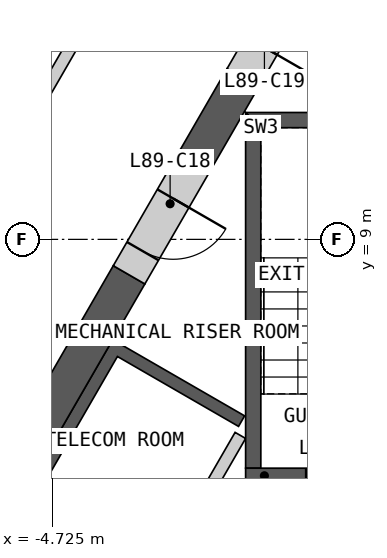
"""IFC4 building model, lengths in metres.
Left out: names, types, materials, properties, quantities, classifications, styles, units other than length and angle.
Written with IfcOpenShell. Run it as: python <this file> out.ifc"""

import sys

from ifc_helpers import new_model, si_unit, direction, frame, frame_2d, origin, place, context, subcontext, project, spatial, polyline, rectangle, outline, extrude, element, fill, save


model = new_model("IFC4")
c1 = context("Model", 3, precision=1e-05, world=origin(), true_north=direction((0.0, 1.0)))
c2 = subcontext(c1, "Body", "Model", "MODEL_VIEW")
j1 = project(units=[si_unit("LENGTHUNIT", "METRE"), si_unit("PLANEANGLEUNIT", "RADIAN")], contexts=[c1])
p1 = place(None, origin())
s1 = spatial("IfcSite", under=j1, at=p1, CompositionType="ELEMENT")
p2 = place(p1, origin())
s2 = spatial("IfcBuilding", under=s1, at=p2, CompositionType="ELEMENT")
p3 = place(p2, frame((0.0, 0.0, 391.6)))
s3 = spatial("IfcBuildingStorey", under=s2, at=p3, CompositionType="ELEMENT", Elevation=391.6)
p4 = place(p3, origin())
e1 = element("IfcWall", 1, at=p4, inside=s3, PredefinedType="SHEAR", context=c2, shape_type="SweptSolid", body=[
    extrude(outline(polyline([(-4.96, 0.208), (-7.131, 1.461), (-3.731, 7.35), (-1.561, 6.097), (-1.66, 5.924), (-3.652, 7.074), (-5.752, 3.437), (-3.76, 2.287), (-3.861, 2.113), (-5.852, 3.263), (-6.852, 1.531), (-4.861, 0.381), (-4.96, 0.208)])), origin(), (0.0, 0.0, 1.0), 3.1),
])
p5 = place(p3, frame((-1.631, 5.776, 0.0), z_axis=(0.0, 0.0, 1.0), x_axis=(-0.499992876559, -0.866029516466, 0.0)))
e2 = element("IfcWall", 2, at=p5, inside=s3, PredefinedType="SOLIDWALL", context=c2, shape_type="SweptSolid", body=[
    extrude(rectangle(XDim=6.486, YDim=0.2, at=frame_2d((3.243, 0.0))), origin(), (0.0, 0.0, 1.0), 3.1),
])
p6 = place(p5, frame((1.537, 0.0, 0.0)))
e3 = element("IfcOpeningElement", 3, at=p6, cuts=e2, PredefinedType="OPENING", context=c2, shape_type="SweptSolid", body=[
    extrude(rectangle(XDim=0.9, YDim=2.1, at=frame_2d((0.45, 1.05))), frame((0.0, 0.11, 0.0), z_axis=(0.0, -1.0, 0.0), x_axis=(1.0, 0.0, 0.0)), (0.0, 0.0, 1.0), 0.22),
])
p7 = place(p5, frame((4.837, 0.0, 0.0)))
e4 = element("IfcOpeningElement", 4, at=p7, cuts=e2, PredefinedType="OPENING", context=c2, shape_type="SweptSolid", body=[
    extrude(rectangle(XDim=0.9, YDim=2.1, at=frame_2d((0.45, 1.05))), frame((0.0, 0.11, 0.0), z_axis=(0.0, -1.0, 0.0), x_axis=(1.0, 0.0, 0.0)), (0.0, 0.0, 1.0), 0.22),
])
p8 = place(p3, origin())
e5 = element("IfcWall", 5, at=p8, inside=s3, PredefinedType="SHEAR", context=c2, shape_type="SweptSolid", body=[
    extrude(outline(polyline([(1.544, 11.087), (-1.544, 11.087), (-1.294, 10.837), (1.294, 10.837), (1.544, 11.087)])), origin(), (0.0, 0.0, 1.0), 3.1),
])
p9 = place(p3, origin())
e6 = element("IfcWall", 6, at=p9, inside=s3, PredefinedType="SHEAR", context=c2, shape_type="SweptSolid", body=[
    extrude(outline(polyline([(-1.294, 10.837), (-1.544, 11.087), (-1.544, 5.237), (-1.294, 5.237), (-1.294, 10.837)])), origin(), (0.0, 0.0, 1.0), 3.1),
])
p10 = place(p3, frame((1.544, 5.112, 0.0), z_axis=(0.0, 0.0, 1.0), x_axis=(-1.0, 0.0, 0.0)))
e7 = element("IfcWall", 7, at=p10, inside=s3, PredefinedType="SHEAR", context=c2, shape_type="SweptSolid", body=[
    extrude(rectangle(XDim=3.088, YDim=0.25, at=frame_2d((1.544, 0.0))), origin(), (0.0, 0.0, 1.0), 3.1),
])
p11 = place(p10, frame((0.994, 0.0, 0.0)))
e8 = element("IfcOpeningElement", 8, at=p11, cuts=e7, PredefinedType="OPENING", context=c2, shape_type="SweptSolid", body=[
    extrude(rectangle(XDim=1.1, YDim=2.1, at=frame_2d((0.55, 1.05))), frame((0.0, 0.135, 0.0), z_axis=(0.0, -1.0, 0.0), x_axis=(1.0, 0.0, 0.0)), (0.0, 0.0, 1.0), 0.27),
])
p12 = place(p3, frame((-3.461, 8.417, 0.0), z_axis=(0.0, 0.0, 1.0), x_axis=(-0.50000391502, -0.866023143435, 0.0)))
e9 = element("IfcWall", 9, at=p12, inside=s3, PredefinedType="SHEAR", context=c2, shape_type="SweptSolid", body=[
    extrude(rectangle(XDim=7.759, YDim=0.6, at=frame_2d((3.879, 0.0))), origin(), (0.0, 0.0, 1.0), 3.1),
])
p13 = place(p3, frame((-1.59, 11.658, 0.0), z_axis=(0.0, 0.0, 1.0), x_axis=(-0.500037594623, -0.866003697431, 0.0)))
e10 = element("IfcWall", 10, at=p13, inside=s3, PredefinedType="SHEAR", context=c2, shape_type="SweptSolid", body=[
    extrude(rectangle(XDim=1.542, YDim=0.6, at=frame_2d((0.771, 0.0))), origin(), (0.0, 0.0, 1.0), 3.1),
])
p14 = place(p3, frame((-2.361, 10.322, 0.0), z_axis=(0.0, 0.0, 1.0), x_axis=(-0.499946605688, -0.86605622881, 0.0)))
e11 = element("IfcWall", 11, at=p14, inside=s3, PredefinedType="SHEAR", context=c2, shape_type="SweptSolid", body=[
    extrude(rectangle(XDim=2.2, YDim=0.6, at=frame_2d((1.1, 0.0))), origin(), (0.0, 0.0, 1.0), 3.1),
])
p15 = place(p14, frame((0.75, 0.0, 0.0)))
e12 = element("IfcOpeningElement", 12, at=p15, cuts=e11, PredefinedType="OPENING", context=c2, shape_type="SweptSolid", body=[
    extrude(rectangle(XDim=1.0, YDim=2.1, at=frame_2d((0.5, 1.05))), frame((0.0, 0.31, 0.0), z_axis=(0.0, -1.0, 0.0), x_axis=(1.0, 0.0, 0.0)), (0.0, 0.0, 1.0), 0.62),
])
p16 = place(p3, frame((-0.26, 13.961, 0.0), z_axis=(0.0, 0.0, 1.0), x_axis=(-0.49997936161, -0.866037319036, 0.0)))
e13 = element("IfcWall", 13, at=p16, inside=s3, PredefinedType="SHEAR", context=c2, shape_type="SweptSolid", body=[
    extrude(rectangle(XDim=2.66, YDim=0.6, at=frame_2d((1.33, 0.0))), origin(), (0.0, 0.0, 1.0), 3.1),
])
p17 = place(p16, frame((1.05, 0.0, 0.0)))
e14 = element("IfcOpeningElement", 14, at=p17, cuts=e13, PredefinedType="OPENING", context=c2, shape_type="SweptSolid", body=[
    extrude(rectangle(XDim=1.0, YDim=2.1, at=frame_2d((0.5, 1.05))), frame((0.0, 0.31, 0.0), z_axis=(0.0, -1.0, 0.0), x_axis=(1.0, 0.0, 0.0)), (0.0, 0.0, 1.0), 0.62),
])
p18 = place(p3, frame((-8.465, 5.15, 0.0), z_axis=(0.0, 0.0, 1.0), x_axis=(0.499992155518, 0.866029932751, 0.0)))
e15 = element("IfcWall", 15, at=p18, inside=s3, PredefinedType="PARTITIONING", context=c2, shape_type="SweptSolid", body=[
    extrude(rectangle(XDim=8.123, YDim=0.2, at=frame_2d((4.062, 0.0))), origin(), (0.0, 0.0, 1.0), 3.1),
])
p19 = place(p18, frame((1.956, 0.0, 0.0)))
e16 = element("IfcOpeningElement", 16, at=p19, cuts=e15, PredefinedType="OPENING", context=c2, shape_type="SweptSolid", body=[
    extrude(rectangle(XDim=1.0, YDim=2.1, at=frame_2d((0.5, 1.05))), frame((0.0, 0.11, 0.0), z_axis=(0.0, -1.0, 0.0), x_axis=(1.0, 0.0, 0.0)), (0.0, 0.0, 1.0), 0.22),
])
p20 = place(p11, origin())
e17 = element("IfcDoor", 17, at=p20, inside=s3, OperationType="SINGLE_SWING_LEFT", PredefinedType="DOOR", context=c2, shape_type="SweptSolid", body=[
    extrude(rectangle(XDim=1.1, YDim=2.1, at=frame_2d((0.55, 1.05))), frame((0.0, 0.025, 0.0), z_axis=(0.0, -1.0, 0.0), x_axis=(1.0, 0.0, 0.0)), (0.0, 0.0, 1.0), 0.05),
])
fill(e8, e17)
p21 = place(p15, origin())
e18 = element("IfcDoor", 18, at=p21, inside=s3, OperationType="SINGLE_SWING_LEFT", PredefinedType="DOOR", context=c2, shape_type="SweptSolid", body=[
    extrude(rectangle(XDim=1.0, YDim=2.1, at=frame_2d((0.5, 1.05))), frame((0.0, 0.055, 0.0), z_axis=(0.0, -1.0, 0.0), x_axis=(1.0, 0.0, 0.0)), (0.0, 0.0, 1.0), 0.05),
])
fill(e12, e18)
save(model, sys.argv[1])
